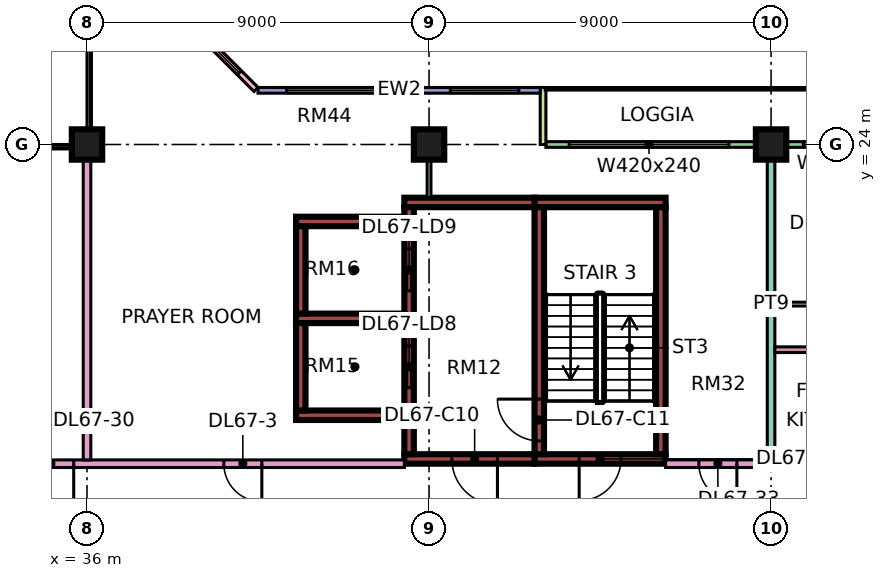
"""IFC4 building model, lengths in metres.
Left out: names, types, materials, properties, quantities, classifications, styles, units other than length and angle.
Written with IfcOpenShell. Run it as: python <this file> out.ifc"""

import sys

from ifc_helpers import new_model, si_unit, direction, frame, frame_2d, origin, origin_2d, place, context, subcontext, project, spatial, rectangle, extrude, element, fill, save


model = new_model("IFC4")
c1 = context("Model", 3, precision=1e-05, world=origin(), true_north=direction((0.0, 1.0)))
c2 = subcontext(c1, "Body", "Model", "MODEL_VIEW")
j1 = project(units=[si_unit("LENGTHUNIT", "METRE"), si_unit("PLANEANGLEUNIT", "RADIAN")], contexts=[c1])
p1 = place(None, origin())
s1 = spatial("IfcSite", under=j1, at=p1, CompositionType="ELEMENT")
p2 = place(p1, origin())
s2 = spatial("IfcBuilding", under=s1, at=p2, CompositionType="ELEMENT")
p3 = place(p2, frame((0.0, 0.0, 288.4)))
s3 = spatial("IfcBuildingStorey", under=s2, at=p3, CompositionType="ELEMENT", Elevation=288.4)
for number, where, z_axis, x_axis in (
    (1, (36.0, 24.0, 0.0), (0.0, 0.0, 1.0), (1.0, 0.0, 0.0)),
    (2, (45.0, 24.0, 0.0), (0.0, 0.0, 1.0), (1.0, 0.0, 0.0)),
    (3, (54.0, 24.0, 0.0), (0.0, 0.0, 1.0), (1.0, 0.0, 0.0)),
):
    element("IfcColumn", number, at=place(p3, frame(where, z_axis=z_axis, x_axis=x_axis)), inside=s3, PredefinedType="COLUMN", context=c2, shape_type="SweptSolid", body=[
        extrude(rectangle(XDim=0.8, YDim=0.8, at=origin_2d()), origin(), (0.0, 0.0, 1.0), 3.75),
    ])
p4 = place(p3, frame((47.775, 15.725, 0.0), z_axis=(0.0, 0.0, 1.0), x_axis=(1.0, 0.0, 0.0)))
e4 = element("IfcWall", 4, at=p4, inside=s3, PredefinedType="SHEAR", context=c2, shape_type="SweptSolid", body=[
    extrude(rectangle(XDim=3.45, YDim=0.25, at=frame_2d((1.725, 0.0))), origin(), (0.0, 0.0, 1.0), 3.75),
])
p5 = place(p4, frame((1.175, 0.0, 0.0)))
e5 = element("IfcOpeningElement", 5, at=p5, cuts=e4, PredefinedType="OPENING", context=c2, shape_type="SweptSolid", body=[
    extrude(rectangle(XDim=1.1, YDim=2.2, at=frame_2d((0.55, 1.1))), frame((0.0, 0.135, 0.0), z_axis=(0.0, -1.0, 0.0), x_axis=(1.0, 0.0, 0.0)), (0.0, 0.0, 1.0), 0.27),
])
p6 = place(p3, frame((47.775, 22.475, 0.0), z_axis=(0.0, 0.0, 1.0), x_axis=(1.0, 0.0, 0.0)))
e6 = element("IfcWall", 6, at=p6, inside=s3, PredefinedType="SHEAR", context=c2, shape_type="SweptSolid", body=[
    extrude(rectangle(XDim=3.45, YDim=0.25, at=frame_2d((1.725, 0.0))), origin(), (0.0, 0.0, 1.0), 3.75),
])
p7 = place(p3, frame((47.9, 15.85, 0.0), z_axis=(0.0, 0.0, 1.0), x_axis=(0.0, 1.0, 0.0)))
e7 = element("IfcWall", 7, at=p7, inside=s3, PredefinedType="SHEAR", context=c2, shape_type="SweptSolid", body=[
    extrude(rectangle(XDim=6.5, YDim=0.25, at=frame_2d((3.25, 0.0))), origin(), (0.0, 0.0, 1.0), 3.75),
])
p8 = place(p7, frame((0.35, 0.0, 0.0)))
e8 = element("IfcOpeningElement", 8, at=p8, cuts=e7, PredefinedType="OPENING", context=c2, shape_type="SweptSolid", body=[
    extrude(rectangle(XDim=1.1, YDim=2.2, at=frame_2d((0.55, 1.1))), frame((0.0, 0.135, 0.0), z_axis=(0.0, -1.0, 0.0), x_axis=(1.0, 0.0, 0.0)), (0.0, 0.0, 1.0), 0.27),
])
p9 = place(p3, frame((51.1, 15.85, 0.0), z_axis=(0.0, 0.0, 1.0), x_axis=(0.0, 1.0, 0.0)))
e9 = element("IfcWall", 9, at=p9, inside=s3, PredefinedType="SHEAR", context=c2, shape_type="SweptSolid", body=[
    extrude(rectangle(XDim=6.5, YDim=0.25, at=frame_2d((3.25, 0.0))), origin(), (0.0, 0.0, 1.0), 3.75),
])
p10 = place(p3, frame((44.35, 15.725, 0.0), z_axis=(0.0, 0.0, 1.0), x_axis=(1.0, 0.0, 0.0)))
e10 = element("IfcWall", 10, at=p10, inside=s3, PredefinedType="SHEAR", context=c2, shape_type="SweptSolid", body=[
    extrude(rectangle(XDim=3.425, YDim=0.25, at=frame_2d((1.712, 0.0))), origin(), (0.0, 0.0, 1.0), 3.75),
])
p11 = place(p10, frame((1.25, 0.0, 0.0)))
e11 = element("IfcOpeningElement", 11, at=p11, cuts=e10, PredefinedType="OPENING", context=c2, shape_type="SweptSolid", body=[
    extrude(rectangle(XDim=1.2, YDim=2.2, at=frame_2d((0.6, 1.1))), frame((0.0, 0.135, 0.0), z_axis=(0.0, -1.0, 0.0), x_axis=(1.0, 0.0, 0.0)), (0.0, 0.0, 1.0), 0.27),
])
p12 = place(p3, frame((44.35, 22.475, 0.0), z_axis=(0.0, 0.0, 1.0), x_axis=(1.0, 0.0, 0.0)))
e12 = element("IfcWall", 12, at=p12, inside=s3, PredefinedType="SHEAR", context=c2, shape_type="SweptSolid", body=[
    extrude(rectangle(XDim=3.425, YDim=0.25, at=frame_2d((1.712, 0.0))), origin(), (0.0, 0.0, 1.0), 3.75),
])
p13 = place(p3, frame((44.475, 15.85, 0.0), z_axis=(0.0, 0.0, 1.0), x_axis=(0.0, 1.0, 0.0)))
e13 = element("IfcWall", 13, at=p13, inside=s3, PredefinedType="SHEAR", context=c2, shape_type="SweptSolid", body=[
    extrude(rectangle(XDim=6.5, YDim=0.25, at=frame_2d((3.25, 0.0))), origin(), (0.0, 0.0, 1.0), 3.75),
])
p14 = place(p13, frame((1.75, 0.0, 0.0)))
e14 = element("IfcOpeningElement", 14, at=p14, cuts=e13, PredefinedType="OPENING", context=c2, shape_type="SweptSolid", body=[
    extrude(rectangle(XDim=1.1, YDim=2.2, at=frame_2d((0.55, 1.1))), frame((0.0, 0.135, 0.0), z_axis=(0.0, -1.0, 0.0), x_axis=(1.0, 0.0, 0.0)), (0.0, 0.0, 1.0), 0.27),
])
p15 = place(p13, frame((4.3, 0.0, 0.0)))
e15 = element("IfcOpeningElement", 15, at=p15, cuts=e13, PredefinedType="OPENING", context=c2, shape_type="SweptSolid", body=[
    extrude(rectangle(XDim=1.1, YDim=2.2, at=frame_2d((0.55, 1.1))), frame((0.0, 0.135, 0.0), z_axis=(0.0, -1.0, 0.0), x_axis=(1.0, 0.0, 0.0)), (0.0, 0.0, 1.0), 0.27),
])
for number, where, z_axis, x_axis in (
    (16, (41.5, 16.875, 0.0), (0.0, 0.0, 1.0), (1.0, 0.0, 0.0)),
    (17, (41.5, 19.425, 0.0), (0.0, 0.0, 1.0), (1.0, 0.0, 0.0)),
    (18, (41.5, 21.975, 0.0), (0.0, 0.0, 1.0), (1.0, 0.0, 0.0)),
):
    element("IfcWall", number, at=place(p3, frame(where, z_axis=z_axis, x_axis=x_axis)), inside=s3, PredefinedType="SHEAR", context=c2, shape_type="SweptSolid", body=[
        extrude(rectangle(XDim=2.85, YDim=0.25, at=frame_2d((1.425, 0.0))), origin(), (0.0, 0.0, 1.0), 3.75),
    ])
for number, where, z_axis, x_axis in (
    (19, (41.625, 17.0, 0.0), (0.0, 0.0, 1.0), (0.0, 1.0, 0.0)),
    (20, (41.625, 19.55, 0.0), (0.0, 0.0, 1.0), (0.0, 1.0, 0.0)),
):
    element("IfcWall", number, at=place(p3, frame(where, z_axis=z_axis, x_axis=x_axis)), inside=s3, PredefinedType="SHEAR", context=c2, shape_type="SweptSolid", body=[
        extrude(rectangle(XDim=2.3, YDim=0.25, at=frame_2d((1.15, 0.0))), origin(), (0.0, 0.0, 1.0), 3.75),
    ])
p16 = place(p3, frame((61.425, 24.0, 0.0), z_axis=(0.0, 0.0, 1.0), x_axis=(-1.0, 0.0, 0.0)))
e21 = element("IfcWall", 21, at=p16, inside=s3, PredefinedType="SOLIDWALL", context=c2, shape_type="SweptSolid", body=[
    extrude(rectangle(XDim=13.35, YDim=0.15, at=frame_2d((6.675, 0.0))), origin(), (0.0, 0.0, 1.0), 3.35),
])
p17 = place(p16, frame((0.262, 0.0, 0.45)))
e22 = element("IfcOpeningElement", 22, at=p17, cuts=e21, PredefinedType="OPENING", context=c2, shape_type="SweptSolid", body=[
    extrude(rectangle(XDim=0.9, YDim=2.4, at=frame_2d((0.45, 1.2))), frame((0.0, 0.085, 0.0), z_axis=(0.0, -1.0, 0.0), x_axis=(1.0, 0.0, 0.0)), (0.0, 0.0, 1.0), 0.17),
])
p18 = place(p16, frame((2.025, 0.0, 0.0)))
e23 = element("IfcOpeningElement", 23, at=p18, cuts=e21, PredefinedType="OPENING", context=c2, shape_type="SweptSolid", body=[
    extrude(rectangle(XDim=1.8, YDim=2.4, at=frame_2d((0.9, 1.2))), frame((0.0, 0.085, 0.0), z_axis=(0.0, -1.0, 0.0), x_axis=(1.0, 0.0, 0.0)), (0.0, 0.0, 1.0), 0.17),
])
p19 = place(p16, frame((4.775, 0.0, 0.45)))
e24 = element("IfcOpeningElement", 24, at=p19, cuts=e21, PredefinedType="OPENING", context=c2, shape_type="SweptSolid", body=[
    extrude(rectangle(XDim=1.8, YDim=2.4, at=frame_2d((0.9, 1.2))), frame((0.0, 0.085, 0.0), z_axis=(0.0, -1.0, 0.0), x_axis=(1.0, 0.0, 0.0)), (0.0, 0.0, 1.0), 0.17),
])
p20 = place(p16, frame((8.538, 0.0, 0.45)))
e25 = element("IfcOpeningElement", 25, at=p20, cuts=e21, PredefinedType="OPENING", context=c2, shape_type="SweptSolid", body=[
    extrude(rectangle(XDim=4.2, YDim=2.4, at=frame_2d((2.1, 1.2))), frame((0.0, 0.085, 0.0), z_axis=(0.0, -1.0, 0.0), x_axis=(1.0, 0.0, 0.0)), (0.0, 0.0, 1.0), 0.17),
])
p21 = place(p3, frame((48.0, 25.5, 0.0), z_axis=(0.0, 0.0, 1.0), x_axis=(0.0, -1.0, 0.0)))
e26 = element("IfcWall", 26, at=p21, inside=s3, PredefinedType="SOLIDWALL", context=c2, shape_type="SweptSolid", body=[
    extrude(rectangle(XDim=1.5, YDim=0.15, at=frame_2d((0.75, 0.0))), origin(), (0.0, 0.0, 1.0), 3.35),
])
p22 = place(p3, frame((47.925, 25.425, 0.0), z_axis=(0.0, 0.0, 1.0), x_axis=(-1.0, 0.0, 0.0)))
e27 = element("IfcWall", 27, at=p22, inside=s3, PredefinedType="SOLIDWALL", context=c2, shape_type="SweptSolid", body=[
    extrude(rectangle(XDim=7.425, YDim=0.15, at=frame_2d((3.712, 0.0))), origin(), (0.0, 0.0, 1.0), 3.35),
])
p23 = place(p22, frame((0.562, 0.0, 0.45)))
e28 = element("IfcOpeningElement", 28, at=p23, cuts=e27, PredefinedType="OPENING", context=c2, shape_type="SweptSolid", body=[
    extrude(rectangle(XDim=1.8, YDim=2.4, at=frame_2d((0.9, 1.2))), frame((0.0, 0.085, 0.0), z_axis=(0.0, -1.0, 0.0), x_axis=(1.0, 0.0, 0.0)), (0.0, 0.0, 1.0), 0.17),
])
p24 = place(p22, frame((3.675, 0.0, 0.45)))
e29 = element("IfcOpeningElement", 29, at=p24, cuts=e27, PredefinedType="OPENING", context=c2, shape_type="SweptSolid", body=[
    extrude(rectangle(XDim=3.0, YDim=2.4, at=frame_2d((1.5, 1.2))), frame((0.0, 0.085, 0.0), z_axis=(0.0, -1.0, 0.0), x_axis=(1.0, 0.0, 0.0)), (0.0, 0.0, 1.0), 0.17),
])
p25 = place(p3, frame((40.447, 25.447, 0.0), z_axis=(0.0, 0.0, 1.0), x_axis=(-0.707106781187, 0.707106781187, 0.0)))
e30 = element("IfcWall", 30, at=p25, inside=s3, PredefinedType="SOLIDWALL", context=c2, shape_type="SweptSolid", body=[
    extrude(rectangle(XDim=4.243, YDim=0.15, at=frame_2d((2.121, 0.0))), origin(), (0.0, 0.0, 1.0), 3.35),
])
p26 = place(p25, frame((0.621, 0.0, 0.45)))
e31 = element("IfcOpeningElement", 31, at=p26, cuts=e30, PredefinedType="OPENING", context=c2, shape_type="SweptSolid", body=[
    extrude(rectangle(XDim=3.0, YDim=2.4, at=frame_2d((1.5, 1.2))), frame((0.0, 0.085, 0.0), z_axis=(0.0, -1.0, 0.0), x_axis=(1.0, 0.0, 0.0)), (0.0, 0.0, 1.0), 0.17),
])
p27 = place(p3, frame((34.0, 15.6, 0.0), z_axis=(0.0, 0.0, 1.0), x_axis=(1.0, 0.0, 0.0)))
e32 = element("IfcWall", 32, at=p27, inside=s3, PredefinedType="PARTITIONING", context=c2, shape_type="SweptSolid", body=[
    extrude(rectangle(XDim=10.35, YDim=0.2, at=frame_2d((5.175, 0.0))), origin(), (0.0, 0.0, 1.0), 3.35),
])
p28 = place(p27, frame((5.6, 0.0, 0.0)))
e33 = element("IfcOpeningElement", 33, at=p28, cuts=e32, PredefinedType="OPENING", context=c2, shape_type="SweptSolid", body=[
    extrude(rectangle(XDim=1.0, YDim=2.1, at=frame_2d((0.5, 1.05))), frame((0.0, 0.11, 0.0), z_axis=(0.0, -1.0, 0.0), x_axis=(1.0, 0.0, 0.0)), (0.0, 0.0, 1.0), 0.22),
])
p29 = place(p27, frame((0.45, 0.0, 0.0)))
e34 = element("IfcOpeningElement", 34, at=p29, cuts=e32, PredefinedType="OPENING", context=c2, shape_type="SweptSolid", body=[
    extrude(rectangle(XDim=1.2, YDim=2.1, at=frame_2d((0.6, 1.05))), frame((0.0, 0.11, 0.0), z_axis=(0.0, -1.0, 0.0), x_axis=(1.0, 0.0, 0.0)), (0.0, 0.0, 1.0), 0.22),
])
p30 = place(p3, frame((36.0, 15.7, 0.0), z_axis=(0.0, 0.0, 1.0), x_axis=(0.0, 1.0, 0.0)))
e35 = element("IfcWall", 35, at=p30, inside=s3, PredefinedType="PARTITIONING", context=c2, shape_type="SweptSolid", body=[
    extrude(rectangle(XDim=8.3, YDim=0.2, at=frame_2d((4.15, 0.0))), origin(), (0.0, 0.0, 1.0), 3.35),
])
p31 = place(p3, frame((45.0, 22.6, 0.0), z_axis=(0.0, 0.0, 1.0), x_axis=(0.0, 1.0, 0.0)))
e36 = element("IfcWall", 36, at=p31, inside=s3, PredefinedType="PARTITIONING", context=c2, shape_type="SweptSolid", body=[
    extrude(rectangle(XDim=1.4, YDim=0.1, at=frame_2d((0.7, 0.0))), origin(), (0.0, 0.0, 1.0), 3.35),
])
p32 = place(p3, frame((51.225, 15.6, 0.0), z_axis=(0.0, 0.0, 1.0), x_axis=(1.0, 0.0, 0.0)))
e37 = element("IfcWall", 37, at=p32, inside=s3, PredefinedType="PARTITIONING", context=c2, shape_type="SweptSolid", body=[
    extrude(rectangle(XDim=13.125, YDim=0.2, at=frame_2d((6.562, 0.0))), origin(), (0.0, 0.0, 1.0), 3.35),
])
p33 = place(p32, frame((9.725, 0.0, 0.0)))
e38 = element("IfcOpeningElement", 38, at=p33, cuts=e37, PredefinedType="OPENING", context=c2, shape_type="SweptSolid", body=[
    extrude(rectangle(XDim=1.0, YDim=2.1, at=frame_2d((0.5, 1.05))), frame((0.0, 0.11, 0.0), z_axis=(0.0, -1.0, 0.0), x_axis=(1.0, 0.0, 0.0)), (0.0, 0.0, 1.0), 0.22),
])
p34 = place(p32, frame((0.875, 0.0, 0.0)))
e39 = element("IfcOpeningElement", 39, at=p34, cuts=e37, PredefinedType="OPENING", context=c2, shape_type="SweptSolid", body=[
    extrude(rectangle(XDim=1.0, YDim=2.1, at=frame_2d((0.5, 1.05))), frame((0.0, 0.11, 0.0), z_axis=(0.0, -1.0, 0.0), x_axis=(1.0, 0.0, 0.0)), (0.0, 0.0, 1.0), 0.22),
])
p35 = place(p3, frame((54.0, 15.7, 0.0), z_axis=(0.0, 0.0, 1.0), x_axis=(0.0, 1.0, 0.0)))
e40 = element("IfcWall", 40, at=p35, inside=s3, PredefinedType="PARTITIONING", context=c2, shape_type="SweptSolid", body=[
    extrude(rectangle(XDim=8.226, YDim=0.2, at=frame_2d((4.113, 0.0))), origin(), (0.0, 0.0, 1.0), 3.35),
])
p36 = place(p3, frame((54.1, 18.6, 0.0), z_axis=(0.0, 0.0, 1.0), x_axis=(1.0, 0.0, 0.0)))
e41 = element("IfcWall", 41, at=p36, inside=s3, PredefinedType="PARTITIONING", context=c2, shape_type="SweptSolid", body=[
    extrude(rectangle(XDim=5.975, YDim=0.15, at=frame_2d((2.987, 0.0))), origin(), (0.0, 0.0, 1.0), 3.35),
])
p37 = place(p36, frame((3.95, 0.0, 0.0)))
e42 = element("IfcOpeningElement", 42, at=p37, cuts=e41, PredefinedType="OPENING", context=c2, shape_type="SweptSolid", body=[
    extrude(rectangle(XDim=0.8, YDim=2.1, at=frame_2d((0.4, 1.05))), frame((0.0, 0.085, 0.0), z_axis=(0.0, -1.0, 0.0), x_axis=(1.0, 0.0, 0.0)), (0.0, 0.0, 1.0), 0.17),
])
p38 = place(p36, frame((0.95, 0.0, 0.0)))
e43 = element("IfcOpeningElement", 43, at=p38, cuts=e41, PredefinedType="OPENING", context=c2, shape_type="SweptSolid", body=[
    extrude(rectangle(XDim=0.9, YDim=2.1, at=frame_2d((0.45, 1.05))), frame((0.0, 0.085, 0.0), z_axis=(0.0, -1.0, 0.0), x_axis=(1.0, 0.0, 0.0)), (0.0, 0.0, 1.0), 0.17),
])
p39 = place(p3, frame((54.1, 19.8, 0.0), z_axis=(0.0, 0.0, 1.0), x_axis=(1.0, 0.0, 0.0)))
e44 = element("IfcWall", 44, at=p39, inside=s3, PredefinedType="PARTITIONING", context=c2, shape_type="SweptSolid", body=[
    extrude(rectangle(XDim=2.85, YDim=0.1, at=frame_2d((1.425, 0.0))), origin(), (0.0, 0.0, 1.0), 3.35),
])
p40 = place(p19, origin())
e45 = element("IfcWindow", 45, at=p40, inside=s3, PartitioningType="SINGLE_PANEL", PredefinedType="WINDOW", context=c2, shape_type="SweptSolid", body=[
    extrude(rectangle(XDim=1.8, YDim=2.4, at=frame_2d((0.9, 1.2))), frame((0.0, 0.03, 0.0), z_axis=(0.0, -1.0, 0.0), x_axis=(1.0, 0.0, 0.0)), (0.0, 0.0, 1.0), 0.06),
])
fill(e24, e45)
p41 = place(p20, origin())
e46 = element("IfcWindow", 46, at=p41, inside=s3, PartitioningType="SINGLE_PANEL", PredefinedType="WINDOW", context=c2, shape_type="SweptSolid", body=[
    extrude(rectangle(XDim=4.2, YDim=2.4, at=frame_2d((2.1, 1.2))), frame((0.0, 0.03, 0.0), z_axis=(0.0, -1.0, 0.0), x_axis=(1.0, 0.0, 0.0)), (0.0, 0.0, 1.0), 0.06),
])
fill(e25, e46)
p42 = place(p23, origin())
e47 = element("IfcWindow", 47, at=p42, inside=s3, PartitioningType="SINGLE_PANEL", PredefinedType="WINDOW", context=c2, shape_type="SweptSolid", body=[
    extrude(rectangle(XDim=1.8, YDim=2.4, at=frame_2d((0.9, 1.2))), frame((0.0, 0.03, 0.0), z_axis=(0.0, -1.0, 0.0), x_axis=(1.0, 0.0, 0.0)), (0.0, 0.0, 1.0), 0.06),
])
fill(e28, e47)
p43 = place(p24, origin())
e48 = element("IfcWindow", 48, at=p43, inside=s3, PartitioningType="SINGLE_PANEL", PredefinedType="WINDOW", context=c2, shape_type="SweptSolid", body=[
    extrude(rectangle(XDim=3.0, YDim=2.4, at=frame_2d((1.5, 1.2))), frame((0.0, 0.03, 0.0), z_axis=(0.0, -1.0, 0.0), x_axis=(1.0, 0.0, 0.0)), (0.0, 0.0, 1.0), 0.06),
])
fill(e29, e48)
p44 = place(p26, origin())
e49 = element("IfcWindow", 49, at=p44, inside=s3, PartitioningType="SINGLE_PANEL", PredefinedType="WINDOW", context=c2, shape_type="SweptSolid", body=[
    extrude(rectangle(XDim=3.0, YDim=2.4, at=frame_2d((1.5, 1.2))), frame((0.0, 0.03, 0.0), z_axis=(0.0, -1.0, 0.0), x_axis=(1.0, 0.0, 0.0)), (0.0, 0.0, 1.0), 0.06),
])
fill(e31, e49)
p45 = place(p5, frame((1.1, 0.0, 0.0), z_axis=(0.0, 0.0, 1.0), x_axis=(-1.0, 0.0, 0.0)))
e50 = element("IfcDoor", 50, at=p45, inside=s3, OperationType="SINGLE_SWING_LEFT", PredefinedType="DOOR", context=c2, shape_type="SweptSolid", body=[
    extrude(rectangle(XDim=1.1, YDim=2.2, at=frame_2d((0.55, 1.1))), frame((0.0, 0.025, 0.0), z_axis=(0.0, -1.0, 0.0), x_axis=(1.0, 0.0, 0.0)), (0.0, 0.0, 1.0), 0.05),
])
fill(e5, e50)
p46 = place(p11, origin())
e51 = element("IfcDoor", 51, at=p46, inside=s3, OperationType="SINGLE_SWING_RIGHT", PredefinedType="DOOR", context=c2, shape_type="SweptSolid", body=[
    extrude(rectangle(XDim=1.2, YDim=2.2, at=frame_2d((0.6, 1.1))), frame((0.0, 0.025, 0.0), z_axis=(0.0, -1.0, 0.0), x_axis=(1.0, 0.0, 0.0)), (0.0, 0.0, 1.0), 0.05),
])
fill(e11, e51)
p47 = place(p8, frame((1.1, 0.0, 0.0), z_axis=(0.0, 0.0, 1.0), x_axis=(-1.0, 0.0, 0.0)))
e52 = element("IfcDoor", 52, at=p47, inside=s3, OperationType="SINGLE_SWING_RIGHT", PredefinedType="DOOR", context=c2, shape_type="SweptSolid", body=[
    extrude(rectangle(XDim=1.1, YDim=2.2, at=frame_2d((0.55, 1.1))), frame((0.0, 0.025, 0.0), z_axis=(0.0, -1.0, 0.0), x_axis=(1.0, 0.0, 0.0)), (0.0, 0.0, 1.0), 0.05),
])
fill(e8, e52)
p48 = place(p14, origin())
e53 = element("IfcDoor", 53, at=p48, inside=s3, OperationType="DOUBLE_DOOR_SLIDING", PredefinedType="DOOR", context=c2, shape_type="SweptSolid", body=[
    extrude(rectangle(XDim=1.1, YDim=2.2, at=frame_2d((0.55, 1.1))), frame((0.0, 0.025, 0.0), z_axis=(0.0, -1.0, 0.0), x_axis=(1.0, 0.0, 0.0)), (0.0, 0.0, 1.0), 0.05),
])
fill(e14, e53)
p49 = place(p15, origin())
e54 = element("IfcDoor", 54, at=p49, inside=s3, OperationType="DOUBLE_DOOR_SLIDING", PredefinedType="DOOR", context=c2, shape_type="SweptSolid", body=[
    extrude(rectangle(XDim=1.1, YDim=2.2, at=frame_2d((0.55, 1.1))), frame((0.0, 0.025, 0.0), z_axis=(0.0, -1.0, 0.0), x_axis=(1.0, 0.0, 0.0)), (0.0, 0.0, 1.0), 0.05),
])
fill(e15, e54)
p50 = place(p28, origin())
e55 = element("IfcDoor", 55, at=p50, inside=s3, OperationType="SINGLE_SWING_RIGHT", PredefinedType="DOOR", context=c2, shape_type="SweptSolid", body=[
    extrude(rectangle(XDim=1.0, YDim=2.1, at=frame_2d((0.5, 1.05))), frame((0.0, 0.025, 0.0), z_axis=(0.0, -1.0, 0.0), x_axis=(1.0, 0.0, 0.0)), (0.0, 0.0, 1.0), 0.05),
])
fill(e33, e55)
p51 = place(p29, origin())
e56 = element("IfcDoor", 56, at=p51, inside=s3, OperationType="SINGLE_SWING_RIGHT", PredefinedType="DOOR", context=c2, shape_type="SweptSolid", body=[
    extrude(rectangle(XDim=1.2, YDim=2.1, at=frame_2d((0.6, 1.05))), frame((0.0, 0.025, 0.0), z_axis=(0.0, -1.0, 0.0), x_axis=(1.0, 0.0, 0.0)), (0.0, 0.0, 1.0), 0.05),
])
fill(e34, e56)
p52 = place(p34, origin())
e57 = element("IfcDoor", 57, at=p52, inside=s3, OperationType="SINGLE_SWING_RIGHT", PredefinedType="DOOR", context=c2, shape_type="SweptSolid", body=[
    extrude(rectangle(XDim=1.0, YDim=2.1, at=frame_2d((0.5, 1.05))), frame((0.0, 0.025, 0.0), z_axis=(0.0, -1.0, 0.0), x_axis=(1.0, 0.0, 0.0)), (0.0, 0.0, 1.0), 0.05),
])
fill(e39, e57)
save(model, sys.argv[1])
